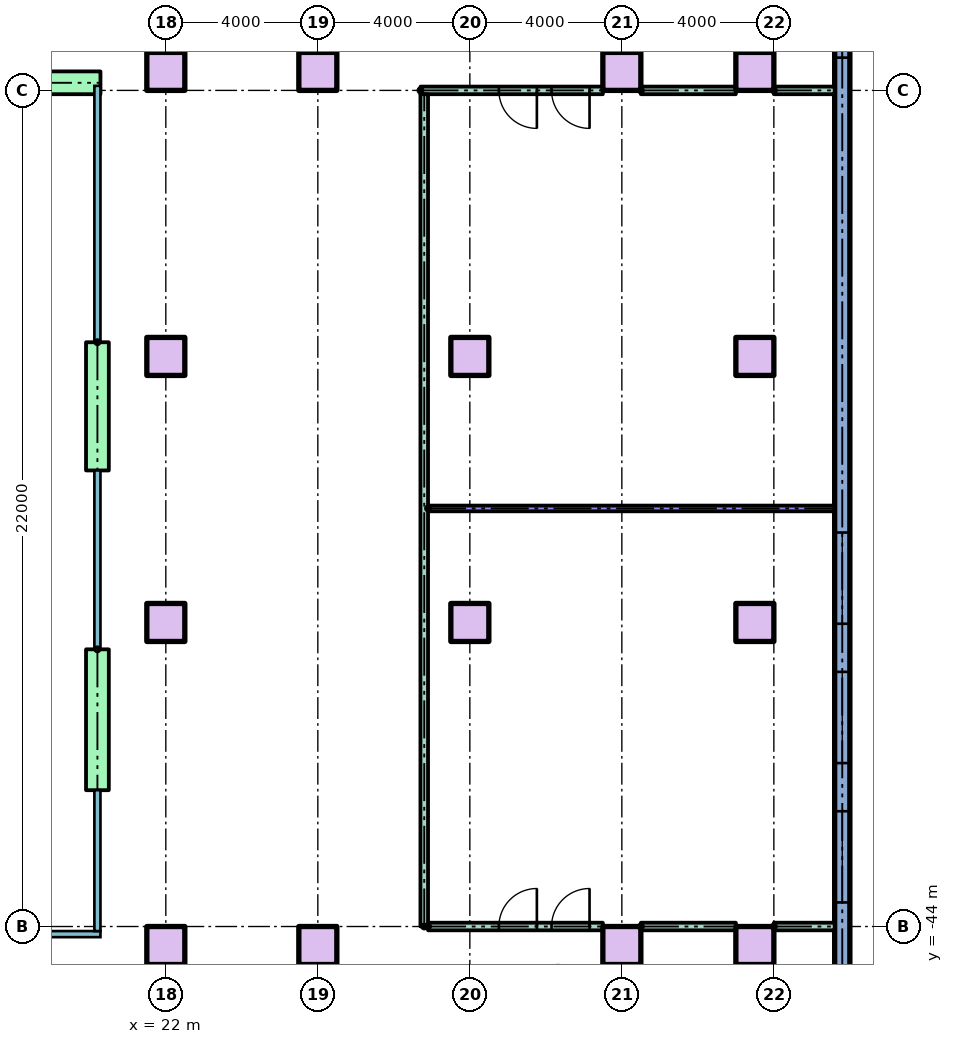
"""IFC4 building model, lengths in metres.
Left out: names, types, materials, properties, quantities, classifications, styles, units other than length and angle.
Written with IfcOpenShell. Run it as: python <this file> out.ifc"""

import sys

from ifc_helpers import new_model, si_unit, direction, frame, frame_2d, origin, origin_2d, place, context, subcontext, project, spatial, rectangle, extrude, element, fill, save


model = new_model("IFC4")
c1 = context("Model", 3, precision=1e-05, world=origin(), true_north=direction((0.0, 1.0)))
c2 = subcontext(c1, "Body", "Model", "MODEL_VIEW")
j1 = project(units=[si_unit("LENGTHUNIT", "METRE"), si_unit("PLANEANGLEUNIT", "RADIAN")], contexts=[c1])
p1 = place(None, origin())
s1 = spatial("IfcSite", under=j1, at=p1, CompositionType="ELEMENT")
p2 = place(p1, origin())
s2 = spatial("IfcBuilding", under=s1, at=p2, CompositionType="ELEMENT")
p3 = place(p2, frame((0.0, 0.0, 6.0)))
s3 = spatial("IfcBuildingStorey", under=s2, at=p3, CompositionType="ELEMENT", Elevation=6.0)
for number, where in (
    (1, (22.0, -44.5, 0.0)),
    (2, (26.0, -44.5, 0.0)),
    (3, (34.0, -44.5, 0.0)),
    (4, (37.5, -44.5, 0.0)),
    (5, (22.0, -36.0, 0.0)),
    (6, (30.0, -36.0, 0.0)),
    (7, (37.5, -36.0, 0.0)),
    (8, (22.0, -29.0, 0.0)),
    (9, (30.0, -29.0, 0.0)),
    (10, (37.5, -29.0, 0.0)),
    (11, (22.0, -21.5, 0.0)),
    (12, (26.0, -21.5, 0.0)),
    (13, (34.0, -21.5, 0.0)),
    (14, (37.5, -21.5, 0.0)),
):
    element("IfcColumn", number, at=place(p3, frame(where)), inside=s3, PredefinedType="COLUMN", context=c2, shape_type="SweptSolid", body=[
        extrude(rectangle(XDim=1.0, YDim=1.0, at=origin_2d()), origin(), (0.0, 0.0, 1.0), 4.0),
    ])
p4 = place(p3, frame((39.8, -50.0, 0.0), z_axis=(0.0, 0.0, 1.0), x_axis=(0.0, 1.0, 0.0)))
e15 = element("IfcWall", 15, at=p4, inside=s3, PredefinedType="STANDARD", context=c2, shape_type="SweptSolid", body=[
    extrude(rectangle(XDim=70.0, YDim=0.4, at=frame_2d((35.0, 0.0))), origin(), (0.0, 0.0, 1.0), 3.7),
])
p5 = place(p4, frame((0.75, 0.0, 0.9)))
e16 = element("IfcOpeningElement", 16, at=p5, cuts=e15, PredefinedType="OPENING", context=c2, shape_type="SweptSolid", body=[
    extrude(rectangle(XDim=2.4, YDim=2.1, at=frame_2d((1.2, 1.05))), frame((0.0, 0.21, 0.0), z_axis=(0.0, -1.0, 0.0), x_axis=(1.0, 0.0, 0.0)), (0.0, 0.0, 1.0), 0.42),
])
p6 = place(p4, frame((6.633, 0.0, 0.9)))
e17 = element("IfcOpeningElement", 17, at=p6, cuts=e15, PredefinedType="OPENING", context=c2, shape_type="SweptSolid", body=[
    extrude(rectangle(XDim=2.4, YDim=2.1, at=frame_2d((1.2, 1.05))), frame((0.0, 0.21, 0.0), z_axis=(0.0, -1.0, 0.0), x_axis=(1.0, 0.0, 0.0)), (0.0, 0.0, 1.0), 0.42),
])
p7 = place(p4, frame((10.3, 0.0, 0.9)))
e18 = element("IfcOpeningElement", 18, at=p7, cuts=e15, PredefinedType="OPENING", context=c2, shape_type="SweptSolid", body=[
    extrude(rectangle(XDim=2.4, YDim=2.1, at=frame_2d((1.2, 1.05))), frame((0.0, 0.21, 0.0), z_axis=(0.0, -1.0, 0.0), x_axis=(1.0, 0.0, 0.0)), (0.0, 0.0, 1.0), 0.42),
])
p8 = place(p4, frame((13.967, 0.0, 0.9)))
e19 = element("IfcOpeningElement", 19, at=p8, cuts=e15, PredefinedType="OPENING", context=c2, shape_type="SweptSolid", body=[
    extrude(rectangle(XDim=2.4, YDim=2.1, at=frame_2d((1.2, 1.05))), frame((0.0, 0.21, 0.0), z_axis=(0.0, -1.0, 0.0), x_axis=(1.0, 0.0, 0.0)), (0.0, 0.0, 1.0), 0.42),
])
p9 = place(p4, frame((28.863, 0.0, 0.9)))
e20 = element("IfcOpeningElement", 20, at=p9, cuts=e15, PredefinedType="OPENING", context=c2, shape_type="SweptSolid", body=[
    extrude(rectangle(XDim=2.4, YDim=2.1, at=frame_2d((1.2, 1.05))), frame((0.0, 0.21, 0.0), z_axis=(0.0, -1.0, 0.0), x_axis=(1.0, 0.0, 0.0)), (0.0, 0.0, 1.0), 0.42),
])
p10 = place(p4, frame((32.988, 0.0, 0.9)))
e21 = element("IfcOpeningElement", 21, at=p10, cuts=e15, PredefinedType="OPENING", context=c2, shape_type="SweptSolid", body=[
    extrude(rectangle(XDim=2.4, YDim=2.1, at=frame_2d((1.2, 1.05))), frame((0.0, 0.21, 0.0), z_axis=(0.0, -1.0, 0.0), x_axis=(1.0, 0.0, 0.0)), (0.0, 0.0, 1.0), 0.42),
])
p11 = place(p4, frame((37.113, 0.0, 0.9)))
e22 = element("IfcOpeningElement", 22, at=p11, cuts=e15, PredefinedType="OPENING", context=c2, shape_type="SweptSolid", body=[
    extrude(rectangle(XDim=2.4, YDim=2.1, at=frame_2d((1.2, 1.05))), frame((0.0, 0.21, 0.0), z_axis=(0.0, -1.0, 0.0), x_axis=(1.0, 0.0, 0.0)), (0.0, 0.0, 1.0), 0.42),
])
p12 = place(p4, frame((41.238, 0.0, 0.9)))
e23 = element("IfcOpeningElement", 23, at=p12, cuts=e15, PredefinedType="OPENING", context=c2, shape_type="SweptSolid", body=[
    extrude(rectangle(XDim=2.4, YDim=2.1, at=frame_2d((1.2, 1.05))), frame((0.0, 0.21, 0.0), z_axis=(0.0, -1.0, 0.0), x_axis=(1.0, 0.0, 0.0)), (0.0, 0.0, 1.0), 0.42),
])
p13 = place(p4, frame((45.363, 0.0, 0.9)))
e24 = element("IfcOpeningElement", 24, at=p13, cuts=e15, PredefinedType="OPENING", context=c2, shape_type="SweptSolid", body=[
    extrude(rectangle(XDim=2.4, YDim=2.1, at=frame_2d((1.2, 1.05))), frame((0.0, 0.21, 0.0), z_axis=(0.0, -1.0, 0.0), x_axis=(1.0, 0.0, 0.0)), (0.0, 0.0, 1.0), 0.42),
])
p14 = place(p4, frame((49.488, 0.0, 0.9)))
e25 = element("IfcOpeningElement", 25, at=p14, cuts=e15, PredefinedType="OPENING", context=c2, shape_type="SweptSolid", body=[
    extrude(rectangle(XDim=2.4, YDim=2.1, at=frame_2d((1.2, 1.05))), frame((0.0, 0.21, 0.0), z_axis=(0.0, -1.0, 0.0), x_axis=(1.0, 0.0, 0.0)), (0.0, 0.0, 1.0), 0.42),
])
p15 = place(p4, frame((53.613, 0.0, 0.9)))
e26 = element("IfcOpeningElement", 26, at=p15, cuts=e15, PredefinedType="OPENING", context=c2, shape_type="SweptSolid", body=[
    extrude(rectangle(XDim=2.4, YDim=2.1, at=frame_2d((1.2, 1.05))), frame((0.0, 0.21, 0.0), z_axis=(0.0, -1.0, 0.0), x_axis=(1.0, 0.0, 0.0)), (0.0, 0.0, 1.0), 0.42),
])
p16 = place(p4, frame((57.738, 0.0, 0.9)))
e27 = element("IfcOpeningElement", 27, at=p16, cuts=e15, PredefinedType="OPENING", context=c2, shape_type="SweptSolid", body=[
    extrude(rectangle(XDim=2.4, YDim=2.1, at=frame_2d((1.2, 1.05))), frame((0.0, 0.21, 0.0), z_axis=(0.0, -1.0, 0.0), x_axis=(1.0, 0.0, 0.0)), (0.0, 0.0, 1.0), 0.42),
])
p17 = place(p4, frame((62.05, 0.0, 0.9)))
e28 = element("IfcOpeningElement", 28, at=p17, cuts=e15, PredefinedType="OPENING", context=c2, shape_type="SweptSolid", body=[
    extrude(rectangle(XDim=2.4, YDim=2.1, at=frame_2d((1.2, 1.05))), frame((0.0, 0.21, 0.0), z_axis=(0.0, -1.0, 0.0), x_axis=(1.0, 0.0, 0.0)), (0.0, 0.0, 1.0), 0.42),
])
p18 = place(p4, frame((66.55, 0.0, 0.9)))
e29 = element("IfcOpeningElement", 29, at=p18, cuts=e15, PredefinedType="OPENING", context=c2, shape_type="SweptSolid", body=[
    extrude(rectangle(XDim=2.4, YDim=2.1, at=frame_2d((1.2, 1.05))), frame((0.0, 0.21, 0.0), z_axis=(0.0, -1.0, 0.0), x_axis=(1.0, 0.0, 0.0)), (0.0, 0.0, 1.0), 0.42),
])
p19 = place(p3, frame((18.53, -21.8, 0.0)))
e30 = element("IfcWall", 30, at=p19, inside=s3, PredefinedType="STANDARD", context=c2, shape_type="SweptSolid", body=[
    extrude(rectangle(XDim=1.75, YDim=0.6, at=frame_2d((0.875, 0.0))), origin(), (0.0, 0.0, 1.0), 3.7),
])
p20 = place(p3, frame((20.2, -28.627, 0.0), z_axis=(0.0, 0.0, 1.0), x_axis=(0.0, -1.0, 0.0)))
e31 = element("IfcWall", 31, at=p20, inside=s3, PredefinedType="STANDARD", context=c2, shape_type="SweptSolid", body=[
    extrude(rectangle(XDim=3.373, YDim=0.6, at=frame_2d((1.687, 0.0))), origin(), (0.0, 0.0, 1.0), 3.7),
])
p21 = place(p3, frame((20.2, -36.707, 0.0), z_axis=(0.0, 0.0, 1.0), x_axis=(0.0, -1.0, 0.0)))
e32 = element("IfcWall", 32, at=p21, inside=s3, PredefinedType="STANDARD", context=c2, shape_type="SweptSolid", body=[
    extrude(rectangle(XDim=3.707, YDim=0.6, at=frame_2d((1.853, 0.0))), origin(), (0.0, 0.0, 1.0), 3.7),
])
p22 = place(p3, frame((28.9, -44.0, 0.0)))
e33 = element("IfcWall", 33, at=p22, inside=s3, PredefinedType="PARTITIONING", context=c2, shape_type="SweptSolid", body=[
    extrude(rectangle(XDim=4.6, YDim=0.2, at=frame_2d((2.3, 0.0))), origin(), (0.0, 0.0, 1.0), 3.7),
])
p23 = place(p22, frame((1.864, 0.0, 0.0)))
e34 = element("IfcOpeningElement", 34, at=p23, cuts=e33, PredefinedType="OPENING", context=c2, shape_type="SweptSolid", body=[
    extrude(rectangle(XDim=1.0, YDim=2.1, at=frame_2d((0.5, 1.05))), frame((0.0, 0.11, 0.0), z_axis=(0.0, -1.0, 0.0), x_axis=(1.0, 0.0, 0.0)), (0.0, 0.0, 1.0), 0.22),
])
p24 = place(p22, frame((3.25, 0.0, 0.0)))
e35 = element("IfcOpeningElement", 35, at=p24, cuts=e33, PredefinedType="OPENING", context=c2, shape_type="SweptSolid", body=[
    extrude(rectangle(XDim=1.0, YDim=2.1, at=frame_2d((0.5, 1.05))), frame((0.0, 0.11, 0.0), z_axis=(0.0, -1.0, 0.0), x_axis=(1.0, 0.0, 0.0)), (0.0, 0.0, 1.0), 0.22),
])
p25 = place(p3, frame((34.5, -44.0, 0.0)))
e36 = element("IfcWall", 36, at=p25, inside=s3, PredefinedType="PARTITIONING", context=c2, shape_type="SweptSolid", body=[
    extrude(rectangle(XDim=2.5, YDim=0.2, at=frame_2d((1.25, 0.0))), origin(), (0.0, 0.0, 1.0), 3.7),
])
p26 = place(p3, frame((38.0, -44.0, 0.0)))
e37 = element("IfcWall", 37, at=p26, inside=s3, PredefinedType="PARTITIONING", context=c2, shape_type="SweptSolid", body=[
    extrude(rectangle(XDim=1.6, YDim=0.2, at=frame_2d((0.8, 0.0))), origin(), (0.0, 0.0, 1.0), 3.7),
])
p27 = place(p3, frame((28.9, -33.0, 0.0)))
e38 = element("IfcWall", 38, at=p27, inside=s3, PredefinedType="PARTITIONING", context=c2, shape_type="SweptSolid", body=[
    extrude(rectangle(XDim=10.7, YDim=0.15, at=frame_2d((5.35, 0.0))), origin(), (0.0, 0.0, 1.0), 3.7),
])
p28 = place(p3, frame((28.7, -22.0, 0.0)))
e39 = element("IfcWall", 39, at=p28, inside=s3, PredefinedType="PARTITIONING", context=c2, shape_type="SweptSolid", body=[
    extrude(rectangle(XDim=4.8, YDim=0.2, at=frame_2d((2.4, 0.0))), origin(), (0.0, 0.0, 1.0), 3.7),
])
p29 = place(p28, frame((2.064, 0.0, 0.0)))
e40 = element("IfcOpeningElement", 40, at=p29, cuts=e39, PredefinedType="OPENING", context=c2, shape_type="SweptSolid", body=[
    extrude(rectangle(XDim=1.0, YDim=2.1, at=frame_2d((0.5, 1.05))), frame((0.0, 0.11, 0.0), z_axis=(0.0, -1.0, 0.0), x_axis=(1.0, 0.0, 0.0)), (0.0, 0.0, 1.0), 0.22),
])
p30 = place(p28, frame((3.45, 0.0, 0.0)))
e41 = element("IfcOpeningElement", 41, at=p30, cuts=e39, PredefinedType="OPENING", context=c2, shape_type="SweptSolid", body=[
    extrude(rectangle(XDim=1.0, YDim=2.1, at=frame_2d((0.5, 1.05))), frame((0.0, 0.11, 0.0), z_axis=(0.0, -1.0, 0.0), x_axis=(1.0, 0.0, 0.0)), (0.0, 0.0, 1.0), 0.22),
])
p31 = place(p3, frame((34.5, -22.0, 0.0)))
e42 = element("IfcWall", 42, at=p31, inside=s3, PredefinedType="PARTITIONING", context=c2, shape_type="SweptSolid", body=[
    extrude(rectangle(XDim=2.5, YDim=0.2, at=frame_2d((1.25, 0.0))), origin(), (0.0, 0.0, 1.0), 3.7),
])
p32 = place(p3, frame((38.0, -22.0, 0.0)))
e43 = element("IfcWall", 43, at=p32, inside=s3, PredefinedType="PARTITIONING", context=c2, shape_type="SweptSolid", body=[
    extrude(rectangle(XDim=1.6, YDim=0.2, at=frame_2d((0.8, 0.0))), origin(), (0.0, 0.0, 1.0), 3.7),
])
p33 = place(p3, frame((28.8, -44.0, 0.0), z_axis=(0.0, 0.0, 1.0), x_axis=(0.0, 1.0, 0.0)))
e44 = element("IfcWall", 44, at=p33, inside=s3, PredefinedType="PARTITIONING", context=c2, shape_type="SweptSolid", body=[
    extrude(rectangle(XDim=21.9, YDim=0.2, at=frame_2d((10.95, 0.0))), origin(), (0.0, 0.0, 1.0), 3.7),
])
p34 = place(p6, origin())
e45 = element("IfcWindow", 45, at=p34, inside=s3, PartitioningType="SINGLE_PANEL", PredefinedType="WINDOW", context=c2, shape_type="SweptSolid", body=[
    extrude(rectangle(XDim=2.4, YDim=2.1, at=frame_2d((1.2, 1.05))), frame((0.0, 0.03, 0.0), z_axis=(0.0, -1.0, 0.0), x_axis=(1.0, 0.0, 0.0)), (0.0, 0.0, 1.0), 0.06),
])
fill(e17, e45)
p35 = place(p7, origin())
e46 = element("IfcWindow", 46, at=p35, inside=s3, PartitioningType="SINGLE_PANEL", PredefinedType="WINDOW", context=c2, shape_type="SweptSolid", body=[
    extrude(rectangle(XDim=2.4, YDim=2.1, at=frame_2d((1.2, 1.05))), frame((0.0, 0.03, 0.0), z_axis=(0.0, -1.0, 0.0), x_axis=(1.0, 0.0, 0.0)), (0.0, 0.0, 1.0), 0.06),
])
fill(e18, e46)
p36 = place(p8, origin())
e47 = element("IfcWindow", 47, at=p36, inside=s3, PartitioningType="SINGLE_PANEL", PredefinedType="WINDOW", context=c2, shape_type="SweptSolid", body=[
    extrude(rectangle(XDim=2.4, YDim=2.1, at=frame_2d((1.2, 1.05))), frame((0.0, 0.03, 0.0), z_axis=(0.0, -1.0, 0.0), x_axis=(1.0, 0.0, 0.0)), (0.0, 0.0, 1.0), 0.06),
])
fill(e19, e47)
p37 = place(p9, origin())
e48 = element("IfcWindow", 48, at=p37, inside=s3, PartitioningType="SINGLE_PANEL", PredefinedType="WINDOW", context=c2, shape_type="SweptSolid", body=[
    extrude(rectangle(XDim=2.4, YDim=2.1, at=frame_2d((1.2, 1.05))), frame((0.0, 0.03, 0.0), z_axis=(0.0, -1.0, 0.0), x_axis=(1.0, 0.0, 0.0)), (0.0, 0.0, 1.0), 0.06),
])
fill(e20, e48)
p38 = place(p23, origin())
e49 = element("IfcDoor", 49, at=p38, inside=s3, OperationType="SINGLE_SWING_RIGHT", PredefinedType="DOOR", context=c2, shape_type="SweptSolid", body=[
    extrude(rectangle(XDim=1.0, YDim=2.1, at=frame_2d((0.5, 1.05))), frame((0.0, 0.025, 0.0), z_axis=(0.0, -1.0, 0.0), x_axis=(1.0, 0.0, 0.0)), (0.0, 0.0, 1.0), 0.05),
])
fill(e34, e49)
p39 = place(p24, origin())
e50 = element("IfcDoor", 50, at=p39, inside=s3, OperationType="SINGLE_SWING_RIGHT", PredefinedType="DOOR", context=c2, shape_type="SweptSolid", body=[
    extrude(rectangle(XDim=1.0, YDim=2.1, at=frame_2d((0.5, 1.05))), frame((0.0, 0.025, 0.0), z_axis=(0.0, -1.0, 0.0), x_axis=(1.0, 0.0, 0.0)), (0.0, 0.0, 1.0), 0.05),
])
fill(e35, e50)
p40 = place(p29, frame((1.0, 0.0, 0.0), z_axis=(0.0, 0.0, 1.0), x_axis=(-1.0, 0.0, 0.0)))
e51 = element("IfcDoor", 51, at=p40, inside=s3, OperationType="SINGLE_SWING_RIGHT", PredefinedType="DOOR", context=c2, shape_type="SweptSolid", body=[
    extrude(rectangle(XDim=1.0, YDim=2.1, at=frame_2d((0.5, 1.05))), frame((0.0, 0.025, 0.0), z_axis=(0.0, -1.0, 0.0), x_axis=(1.0, 0.0, 0.0)), (0.0, 0.0, 1.0), 0.05),
])
fill(e40, e51)
p41 = place(p30, frame((1.0, 0.0, 0.0), z_axis=(0.0, 0.0, 1.0), x_axis=(-1.0, 0.0, 0.0)))
e52 = element("IfcDoor", 52, at=p41, inside=s3, OperationType="SINGLE_SWING_RIGHT", PredefinedType="DOOR", context=c2, shape_type="SweptSolid", body=[
    extrude(rectangle(XDim=1.0, YDim=2.1, at=frame_2d((0.5, 1.05))), frame((0.0, 0.025, 0.0), z_axis=(0.0, -1.0, 0.0), x_axis=(1.0, 0.0, 0.0)), (0.0, 0.0, 1.0), 0.05),
])
fill(e41, e52)
save(model, sys.argv[1])
